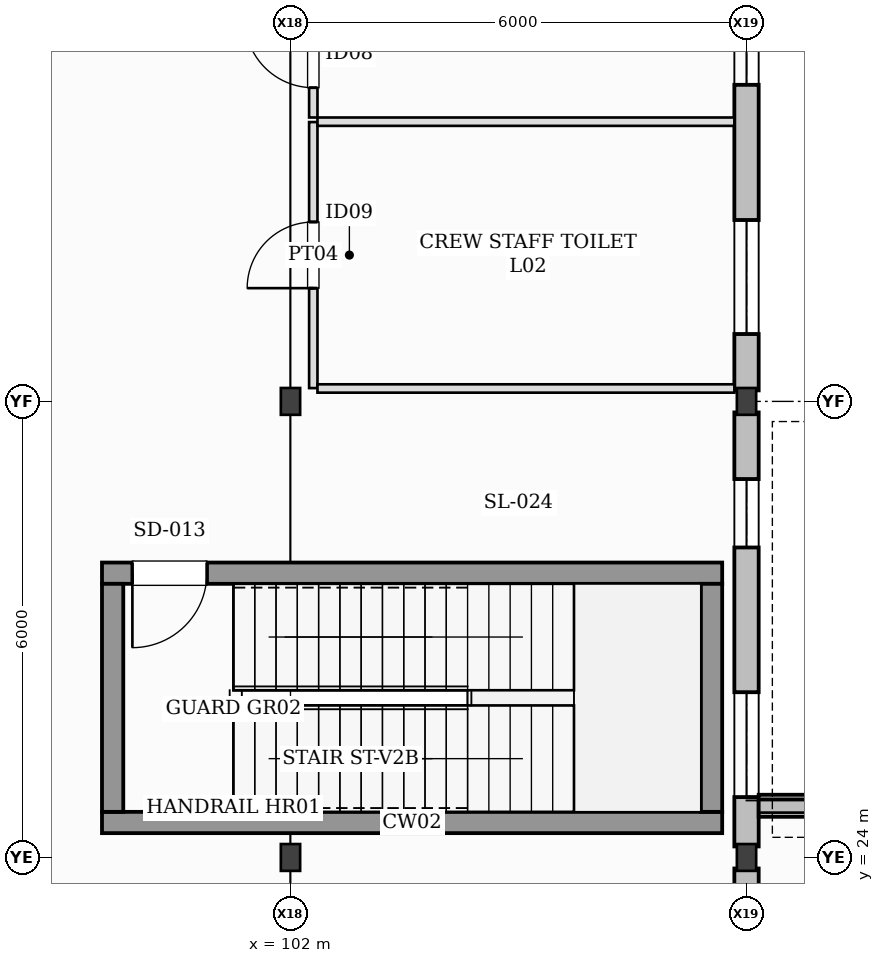
"""IFC4 building model, lengths in metres.
Left out: names, types, materials, properties, quantities, classifications, styles, units other than length and angle.
Written with IfcOpenShell. Run it as: python <this file> out.ifc"""

import sys

from ifc_helpers import new_model, si_unit, direction, frame, frame_2d, origin, origin_2d, place, context, subcontext, project, spatial, rectangle, i_section, extrude, element, fill, save


model = new_model("IFC4")
c1 = context("Model", 3, precision=1e-05, world=origin(), true_north=direction((0.0, 1.0)))
c2 = subcontext(c1, "Body", "Model", "MODEL_VIEW")
j1 = project(units=[si_unit("LENGTHUNIT", "METRE"), si_unit("PLANEANGLEUNIT", "RADIAN")], contexts=[c1])
p1 = place(None, origin())
s1 = spatial("IfcSite", under=j1, at=p1, CompositionType="ELEMENT")
p2 = place(p1, origin())
s2 = spatial("IfcBuilding", under=s1, at=p2, CompositionType="ELEMENT")
p3 = place(p2, frame((0.0, 0.0, 6.0)))
s3 = spatial("IfcBuildingStorey", under=s2, at=p3, CompositionType="ELEMENT", Elevation=6.0)
for number, where, z_axis, x_axis in (
    (1, (102.0, 24.0, 0.0), (0.0, 0.0, 1.0), (1.0, 0.0, 0.0)),
    (2, (102.0, 30.0, 0.0), (0.0, 0.0, 1.0), (1.0, 0.0, 0.0)),
    (3, (108.0, 24.0, 0.0), (0.0, 0.0, 1.0), (1.0, 0.0, 0.0)),
    (4, (108.0, 30.0, 0.0), (0.0, 0.0, 1.0), (1.0, 0.0, 0.0)),
):
    element("IfcColumn", number, at=place(p3, frame(where, z_axis=z_axis, x_axis=x_axis)), inside=s3, PredefinedType="COLUMN", context=c2, shape_type="SweptSolid", body=[
        extrude(i_section(OverallWidth=0.254, OverallDepth=0.353, WebThickness=0.01, FlangeThickness=0.016, at=origin_2d()), origin(), (0.0, 0.0, 1.0), 4.0),
    ])
p4 = place(p3, frame((108.0, 18.145, 0.0), z_axis=(0.0, 0.0, 1.0), x_axis=(0.0, 1.0, 0.0)))
e5 = element("IfcWall", 5, at=p4, inside=s3, PredefinedType="STANDARD", context=c2, shape_type="SweptSolid", body=[
    extrude(rectangle(XDim=5.71, YDim=0.32, at=frame_2d((2.855, 0.0))), origin(), (0.0, 0.0, 1.0), 4.0),
])
p5 = place(p4, frame((0.897, 0.0, 0.86)))
e6 = element("IfcOpeningElement", 6, at=p5, cuts=e5, PredefinedType="OPENING", context=c2, shape_type="SweptSolid", body=[
    extrude(rectangle(XDim=1.26, YDim=1.26, at=frame_2d((0.63, 0.63))), frame((0.0, 0.17, 0.0), z_axis=(0.0, -1.0, 0.0), x_axis=(1.0, 0.0, 0.0)), (0.0, 0.0, 1.0), 0.34),
])
p6 = place(p4, frame((3.357, 0.0, 1.42)))
e7 = element("IfcOpeningElement", 7, at=p6, cuts=e5, PredefinedType="OPENING", context=c2, shape_type="SweptSolid", body=[
    extrude(rectangle(XDim=1.5, YDim=1.5, at=frame_2d((0.75, 0.75))), frame((0.0, 0.17, 0.0), z_axis=(0.0, -1.0, 0.0), x_axis=(1.0, 0.0, 0.0)), (0.0, 0.0, 1.0), 0.34),
])
p7 = place(p3, frame((108.0, 24.145, 0.0), z_axis=(0.0, 0.0, 1.0), x_axis=(0.0, 1.0, 0.0)))
e8 = element("IfcWall", 8, at=p7, inside=s3, PredefinedType="STANDARD", context=c2, shape_type="SweptSolid", body=[
    extrude(rectangle(XDim=5.71, YDim=0.32, at=frame_2d((2.855, 0.0))), origin(), (0.0, 0.0, 1.0), 3.157),
])
p8 = place(p7, frame((0.649, 0.0, 1.18)))
e9 = element("IfcOpeningElement", 9, at=p8, cuts=e8, PredefinedType="OPENING", context=c2, shape_type="SweptSolid", body=[
    extrude(rectangle(XDim=1.38, YDim=1.38, at=frame_2d((0.69, 0.69))), frame((0.0, 0.17, 0.0), z_axis=(0.0, -1.0, 0.0), x_axis=(1.0, 0.0, 0.0)), (0.0, 0.0, 1.0), 0.34),
])
p9 = place(p7, frame((3.933, 0.0, 0.96)))
e10 = element("IfcOpeningElement", 10, at=p9, cuts=e8, PredefinedType="OPENING", context=c2, shape_type="SweptSolid", body=[
    extrude(rectangle(XDim=0.9, YDim=0.9, at=frame_2d((0.45, 0.45))), frame((0.0, 0.17, 0.0), z_axis=(0.0, -1.0, 0.0), x_axis=(1.0, 0.0, 0.0)), (0.0, 0.0, 1.0), 0.34),
])
p10 = place(p3, frame((108.0, 30.145, 0.0), z_axis=(0.0, 0.0, 1.0), x_axis=(0.0, 1.0, 0.0)))
e11 = element("IfcWall", 11, at=p10, inside=s3, PredefinedType="STANDARD", context=c2, shape_type="SweptSolid", body=[
    extrude(rectangle(XDim=5.71, YDim=0.32, at=frame_2d((2.855, 0.0))), origin(), (0.0, 0.0, 1.0), 3.157),
])
p11 = place(p10, frame((0.741, 0.0, 0.82)))
e12 = element("IfcOpeningElement", 12, at=p11, cuts=e11, PredefinedType="OPENING", context=c2, shape_type="SweptSolid", body=[
    extrude(rectangle(XDim=1.5, YDim=1.5, at=frame_2d((0.75, 0.75))), frame((0.0, 0.17, 0.0), z_axis=(0.0, -1.0, 0.0), x_axis=(1.0, 0.0, 0.0)), (0.0, 0.0, 1.0), 0.34),
])
p12 = place(p10, frame((4.02, 0.0, 1.28)))
e13 = element("IfcOpeningElement", 13, at=p12, cuts=e11, PredefinedType="OPENING", context=c2, shape_type="SweptSolid", body=[
    extrude(rectangle(XDim=1.02, YDim=1.02, at=frame_2d((0.51, 0.51))), frame((0.0, 0.17, 0.0), z_axis=(0.0, -1.0, 0.0), x_axis=(1.0, 0.0, 0.0)), (0.0, 0.0, 1.0), 0.34),
])
p13 = place(p3, frame((112.04, 24.68, 0.0), z_axis=(0.0, 0.0, 1.0), x_axis=(-1.0, 0.0, 0.0)))
e14 = element("IfcWall", 14, at=p13, inside=s3, PredefinedType="STANDARD", context=c2, shape_type="SweptSolid", body=[
    extrude(rectangle(XDim=3.88, YDim=0.29, at=frame_2d((1.94, 0.0))), origin(), (0.0, 0.0, 1.0), 0.56),
])
p14 = place(p3, frame((99.52, 24.46, 0.0), z_axis=(0.0, 0.0, 1.0), x_axis=(1.0, 0.0, 0.0)))
e15 = element("IfcWall", 15, at=p14, inside=s3, PredefinedType="SHEAR", context=c2, shape_type="SweptSolid", body=[
    extrude(rectangle(XDim=8.16, YDim=0.28, at=frame_2d((4.08, 0.0))), origin(), (0.0, 0.0, 1.0), 4.0),
])
p15 = place(p3, frame((107.68, 27.74, 0.0), z_axis=(0.0, 0.0, 1.0), x_axis=(-1.0, 0.0, 0.0)))
e16 = element("IfcWall", 16, at=p15, inside=s3, PredefinedType="SHEAR", context=c2, shape_type="SweptSolid", body=[
    extrude(rectangle(XDim=8.16, YDim=0.28, at=frame_2d((4.08, 0.0))), origin(), (0.0, 0.0, 1.0), 4.0),
])
p16 = place(p15, frame((6.78, 0.0, 0.0)))
e17 = element("IfcOpeningElement", 17, at=p16, cuts=e16, PredefinedType="OPENING", context=c2, shape_type="SweptSolid", body=[
    extrude(rectangle(XDim=0.98, YDim=2.15, at=frame_2d((0.49, 1.075))), frame((0.0, 0.15, 0.0), z_axis=(0.0, -1.0, 0.0), x_axis=(1.0, 0.0, 0.0)), (0.0, 0.0, 1.0), 0.3),
])
for number, where, z_axis, x_axis in (
    (18, (99.66, 27.6, 0.0), (0.0, 0.0, 1.0), (0.0, -1.0, 0.0)),
    (19, (107.54, 24.6, 0.0), (0.0, 0.0, 1.0), (0.0, 1.0, 0.0)),
):
    element("IfcWall", number, at=place(p3, frame(where, z_axis=z_axis, x_axis=x_axis)), inside=s3, PredefinedType="SHEAR", context=c2, shape_type="SweptSolid", body=[
        extrude(rectangle(XDim=3.0, YDim=0.28, at=frame_2d((1.5, 0.0))), origin(), (0.0, 0.0, 1.0), 4.0),
    ])
p17 = place(p3, frame((102.3, 30.175, 0.0), z_axis=(0.0, 0.0, 1.0), x_axis=(0.0, 1.0, 0.0)))
e20 = element("IfcWall", 20, at=p17, inside=s3, PredefinedType="PARTITIONING", context=c2, shape_type="SweptSolid", body=[
    extrude(rectangle(XDim=3.5, YDim=0.11, at=frame_2d((1.75, 0.0))), origin(), (0.0, 0.0, 1.0), 3.157),
])
p18 = place(p17, frame((1.315, 0.0, 0.0)))
e21 = element("IfcOpeningElement", 21, at=p18, cuts=e20, PredefinedType="OPENING", context=c2, shape_type="SweptSolid", body=[
    extrude(rectangle(XDim=0.87, YDim=2.06, at=frame_2d((0.435, 1.03))), frame((0.0, 0.065, 0.0), z_axis=(0.0, -1.0, 0.0), x_axis=(1.0, 0.0, 0.0)), (0.0, 0.0, 1.0), 0.13),
])
p19 = place(p3, frame((102.355, 33.68, 0.0), z_axis=(0.0, 0.0, 1.0), x_axis=(1.0, 0.0, 0.0)))
e22 = element("IfcWall", 22, at=p19, inside=s3, PredefinedType="PARTITIONING", context=c2, shape_type="SweptSolid", body=[
    extrude(rectangle(XDim=5.485, YDim=0.11, at=frame_2d((2.743, 0.0))), origin(), (0.0, 0.0, 1.0), 3.72),
])
p20 = place(p3, frame((107.84, 30.17, 0.0), z_axis=(0.0, 0.0, 1.0), x_axis=(-1.0, 0.0, 0.0)))
e23 = element("IfcWall", 23, at=p20, inside=s3, PredefinedType="PARTITIONING", context=c2, shape_type="SweptSolid", body=[
    extrude(rectangle(XDim=5.485, YDim=0.11, at=frame_2d((2.743, 0.0))), origin(), (0.0, 0.0, 1.0), 3.153),
])
p21 = place(p3, frame((102.3, 33.735, 0.0), z_axis=(0.0, 0.0, 1.0), x_axis=(0.0, 1.0, 0.0)))
e24 = element("IfcWall", 24, at=p21, inside=s3, PredefinedType="PARTITIONING", context=c2, shape_type="SweptSolid", body=[
    extrude(rectangle(XDim=3.54, YDim=0.11, at=frame_2d((1.77, 0.0))), origin(), (0.0, 0.0, 1.0), 3.157),
])
p22 = place(p21, frame((0.392, 0.0, 0.0)))
e25 = element("IfcOpeningElement", 25, at=p22, cuts=e24, PredefinedType="OPENING", context=c2, shape_type="SweptSolid", body=[
    extrude(rectangle(XDim=0.9, YDim=2.1, at=frame_2d((0.45, 1.05))), frame((0.0, 0.065, 0.0), z_axis=(0.0, -1.0, 0.0), x_axis=(1.0, 0.0, 0.0)), (0.0, 0.0, 1.0), 0.13),
])
p23 = place(p8, origin())
e26 = element("IfcWindow", 26, at=p23, inside=s3, PartitioningType="SINGLE_PANEL", PredefinedType="WINDOW", context=c2, shape_type="SweptSolid", body=[
    extrude(rectangle(XDim=1.38, YDim=1.38, at=frame_2d((0.69, 0.69))), frame((0.0, 0.03, 0.0), z_axis=(0.0, -1.0, 0.0), x_axis=(1.0, 0.0, 0.0)), (0.0, 0.0, 1.0), 0.06),
])
fill(e9, e26)
p24 = place(p9, origin())
e27 = element("IfcWindow", 27, at=p24, inside=s3, PartitioningType="SINGLE_PANEL", PredefinedType="WINDOW", context=c2, shape_type="SweptSolid", body=[
    extrude(rectangle(XDim=0.9, YDim=0.9, at=frame_2d((0.45, 0.45))), frame((0.0, 0.03, 0.0), z_axis=(0.0, -1.0, 0.0), x_axis=(1.0, 0.0, 0.0)), (0.0, 0.0, 1.0), 0.06),
])
fill(e10, e27)
p25 = place(p11, origin())
e28 = element("IfcWindow", 28, at=p25, inside=s3, PartitioningType="SINGLE_PANEL", PredefinedType="WINDOW", context=c2, shape_type="SweptSolid", body=[
    extrude(rectangle(XDim=1.5, YDim=1.5, at=frame_2d((0.75, 0.75))), frame((0.0, 0.03, 0.0), z_axis=(0.0, -1.0, 0.0), x_axis=(1.0, 0.0, 0.0)), (0.0, 0.0, 1.0), 0.06),
])
fill(e12, e28)
p26 = place(p12, origin())
e29 = element("IfcWindow", 29, at=p26, inside=s3, PartitioningType="SINGLE_PANEL", PredefinedType="WINDOW", context=c2, shape_type="SweptSolid", body=[
    extrude(rectangle(XDim=1.02, YDim=1.02, at=frame_2d((0.51, 0.51))), frame((0.0, 0.03, 0.0), z_axis=(0.0, -1.0, 0.0), x_axis=(1.0, 0.0, 0.0)), (0.0, 0.0, 1.0), 0.06),
])
fill(e13, e29)
p27 = place(p16, origin())
e30 = element("IfcDoor", 30, at=p27, inside=s3, OperationType="SINGLE_SWING_RIGHT", PredefinedType="DOOR", context=c2, shape_type="SweptSolid", body=[
    extrude(rectangle(XDim=0.98, YDim=2.15, at=frame_2d((0.49, 1.075))), frame((0.0, 0.025, 0.0), z_axis=(0.0, -1.0, 0.0), x_axis=(1.0, 0.0, 0.0)), (0.0, 0.0, 1.0), 0.05),
])
fill(e17, e30)
p28 = place(p18, frame((0.87, 0.0, 0.0), z_axis=(0.0, 0.0, 1.0), x_axis=(-1.0, 0.0, 0.0)))
e31 = element("IfcDoor", 31, at=p28, inside=s3, OperationType="SINGLE_SWING_LEFT", PredefinedType="DOOR", context=c2, shape_type="SweptSolid", body=[
    extrude(rectangle(XDim=0.87, YDim=2.06, at=frame_2d((0.435, 1.03))), frame((0.0, 0.025, 0.0), z_axis=(0.0, -1.0, 0.0), x_axis=(1.0, 0.0, 0.0)), (0.0, 0.0, 1.0), 0.05),
])
fill(e21, e31)
p29 = place(p22, frame((0.9, 0.0, 0.0), z_axis=(0.0, 0.0, 1.0), x_axis=(-1.0, 0.0, 0.0)))
e32 = element("IfcDoor", 32, at=p29, inside=s3, OperationType="SINGLE_SWING_RIGHT", PredefinedType="DOOR", context=c2, shape_type="SweptSolid", body=[
    extrude(rectangle(XDim=0.9, YDim=2.1, at=frame_2d((0.45, 1.05))), frame((0.0, 0.025, 0.0), z_axis=(0.0, -1.0, 0.0), x_axis=(1.0, 0.0, 0.0)), (0.0, 0.0, 1.0), 0.05),
])
fill(e25, e32)
save(model, sys.argv[1])
